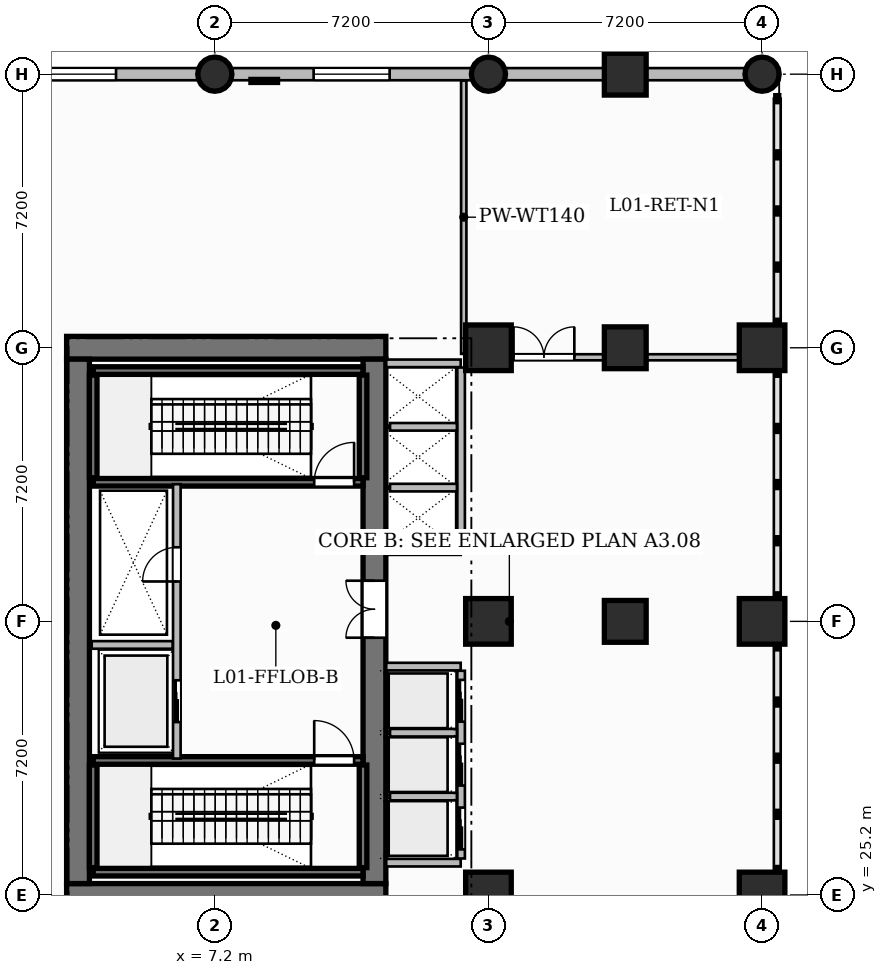
"""IFC4 building model, lengths in metres.
Left out: names, types, materials, properties, quantities, classifications, styles, units other than length and angle.
Written with IfcOpenShell. Run it as: python <this file> out.ifc"""

import sys

from ifc_helpers import new_model, si_unit, direction, frame, frame_2d, origin, origin_2d, place, context, subcontext, project, spatial, rectangle, circle, extrude, source, transform, mapped, element, fill, save


model = new_model("IFC4")
c1 = context("Model", 3, precision=1e-05, world=origin(), true_north=direction((0.0, 1.0)))
c2 = subcontext(c1, "Body", "Model", "MODEL_VIEW")
j1 = project(units=[si_unit("LENGTHUNIT", "METRE"), si_unit("PLANEANGLEUNIT", "RADIAN")], contexts=[c1])
p1 = place(None, origin())
s1 = spatial("IfcSite", under=j1, at=p1, CompositionType="ELEMENT")
p2 = place(p1, origin())
s2 = spatial("IfcBuilding", under=s1, at=p2, CompositionType="ELEMENT")
p3 = place(p2, frame((0.0, 0.0, 5.4)))
s3 = spatial("IfcBuildingStorey", under=s2, at=p3, CompositionType="ELEMENT", Elevation=5.4)
for number, where, z_axis, x_axis in (
    (1, (3.3, 25.2, 0.0), (0.0, 0.0, 1.0), (1.0, 0.0, 0.0)),
    (2, (3.3, 39.6, 0.0), (0.0, 0.0, 1.0), (1.0, 0.0, 0.0)),
):
    element("IfcWall", number, at=place(p3, frame(where, z_axis=z_axis, x_axis=x_axis)), inside=s3, PredefinedType="SHEAR", context=c2, shape_type="SweptSolid", body=[
        extrude(rectangle(XDim=8.4, YDim=0.6, at=frame_2d((4.2, 0.0))), origin(), (0.0, 0.0, 1.0), 5.4),
    ])
p4 = place(p3, frame((3.6, 25.5, 0.0), z_axis=(0.0, 0.0, 1.0), x_axis=(0.0, 1.0, 0.0)))
e3 = element("IfcWall", 3, at=p4, inside=s3, PredefinedType="SHEAR", context=c2, shape_type="SweptSolid", body=[
    extrude(rectangle(XDim=13.8, YDim=0.6, at=frame_2d((6.9, 0.0))), origin(), (0.0, 0.0, 1.0), 5.4),
])
p5 = place(p3, frame((11.4, 25.5, 0.0), z_axis=(0.0, 0.0, 1.0), x_axis=(0.0, 1.0, 0.0)))
e4 = element("IfcWall", 4, at=p5, inside=s3, PredefinedType="SHEAR", context=c2, shape_type="SweptSolid", body=[
    extrude(rectangle(XDim=13.8, YDim=0.6, at=frame_2d((6.9, 0.0))), origin(), (0.0, 0.0, 1.0), 5.4),
])
p6 = place(p5, frame((6.47, 0.0, 0.0)))
e5 = element("IfcOpeningElement", 5, at=p6, cuts=e4, PredefinedType="OPENING", context=c2, shape_type="SweptSolid", body=[
    extrude(rectangle(XDim=1.5, YDim=2.2, at=frame_2d((0.75, 1.1))), frame((0.0, 0.31, 0.0), z_axis=(0.0, -1.0, 0.0), x_axis=(1.0, 0.0, 0.0)), (0.0, 0.0, 1.0), 0.62),
])
m1 = source(origin(), c2, "Body", "SweptSolid", [
    extrude(circle(Radius=0.45, at=origin_2d()), origin(), (0.0, 0.0, 1.0), 5.4),
])
p7 = place(p3, frame((7.2, 46.8, 0.0), z_axis=(0.0, 0.0, 1.0), x_axis=(1.0, 0.0, 0.0)))
e6 = element("IfcColumn", 6, at=p7, inside=s3, PredefinedType="COLUMN", context=c2, shape_type="MappedRepresentation", body=[
    mapped(m1, transform((0.0, 0.0, 0.0), scale=1.0)),
])
m2 = source(origin(), c2, "Body", "SweptSolid", [
    extrude(rectangle(XDim=1.2, YDim=1.2, at=origin_2d()), origin(), (0.0, 0.0, 1.0), 5.4),
])
for number, where, z_axis, x_axis in (
    (7, (14.4, 25.2, 0.0), (0.0, 0.0, 1.0), (1.0, 0.0, 0.0)),
    (8, (14.4, 32.4, 0.0), (0.0, 0.0, 1.0), (1.0, 0.0, 0.0)),
    (9, (14.4, 39.6, 0.0), (0.0, 0.0, 1.0), (1.0, 0.0, 0.0)),
):
    element("IfcColumn", number, at=place(p3, frame(where, z_axis=z_axis, x_axis=x_axis)), inside=s3, PredefinedType="COLUMN", context=c2, shape_type="MappedRepresentation", body=[
        mapped(m2, transform((0.0, 0.0, 0.0), scale=1.0)),
    ])
p8 = place(p3, frame((14.4, 46.8, 0.0), z_axis=(0.0, 0.0, 1.0), x_axis=(1.0, 0.0, 0.0)))
e10 = element("IfcColumn", 10, at=p8, inside=s3, PredefinedType="COLUMN", context=c2, shape_type="MappedRepresentation", body=[
    mapped(m1, transform((0.0, 0.0, 0.0), scale=1.0)),
])
for number, where, z_axis, x_axis in (
    (11, (21.6, 25.2, 0.0), (0.0, 0.0, 1.0), (1.0, 0.0, 0.0)),
    (12, (21.6, 32.4, 0.0), (0.0, 0.0, 1.0), (1.0, 0.0, 0.0)),
    (13, (21.6, 39.6, 0.0), (0.0, 0.0, 1.0), (1.0, 0.0, 0.0)),
):
    element("IfcColumn", number, at=place(p3, frame(where, z_axis=z_axis, x_axis=x_axis)), inside=s3, PredefinedType="COLUMN", context=c2, shape_type="MappedRepresentation", body=[
        mapped(m2, transform((0.0, 0.0, 0.0), scale=1.0)),
    ])
p9 = place(p3, frame((21.6, 46.8, 0.0), z_axis=(0.0, 0.0, 1.0), x_axis=(1.0, 0.0, 0.0)))
e14 = element("IfcColumn", 14, at=p9, inside=s3, PredefinedType="COLUMN", context=c2, shape_type="MappedRepresentation", body=[
    mapped(m1, transform((0.0, 0.0, 0.0), scale=1.0)),
])
m3 = source(origin(), c2, "Body", "SweptSolid", [
    extrude(rectangle(XDim=1.1, YDim=1.1, at=origin_2d()), origin(), (0.0, 0.0, 1.0), 5.4),
])
for number, where, z_axis, x_axis in (
    (15, (18.0, 32.4, 0.0), (0.0, 0.0, 1.0), (1.0, 0.0, 0.0)),
    (16, (18.0, 39.6, 0.0), (0.0, 0.0, 1.0), (1.0, 0.0, 0.0)),
    (17, (18.0, 46.8, 0.0), (0.0, 0.0, 1.0), (1.0, 0.0, 0.0)),
):
    element("IfcColumn", number, at=place(p3, frame(where, z_axis=z_axis, x_axis=x_axis)), inside=s3, PredefinedType="COLUMN", context=c2, shape_type="MappedRepresentation", body=[
        mapped(m3, transform((0.0, 0.0, 0.0), scale=1.0)),
    ])
p10 = place(p3, frame((4.0, 25.8, 0.0), z_axis=(0.0, 0.0, 1.0), x_axis=(1.0, 0.0, 0.0)))
e18 = element("IfcWall", 18, at=p10, inside=s3, PredefinedType="SHEAR", context=c2, shape_type="SweptSolid", body=[
    extrude(rectangle(XDim=7.1, YDim=0.2, at=frame_2d((3.55, 0.0))), origin(), (0.0, 0.0, 1.0), 5.4),
])
for number, where, z_axis, x_axis in (
    (19, (4.0, 25.92, 0.0), (0.0, 0.0, 1.0), (0.0, 1.0, 0.0)),
    (20, (11.1, 25.92, 0.0), (0.0, 0.0, 1.0), (0.0, 1.0, 0.0)),
):
    element("IfcWall", number, at=place(p3, frame(where, z_axis=z_axis, x_axis=x_axis)), inside=s3, PredefinedType="SHEAR", context=c2, shape_type="SweptSolid", body=[
        extrude(rectangle(XDim=2.7, YDim=0.2, at=frame_2d((1.35, 0.0))), origin(), (0.0, 0.0, 1.0), 5.4),
    ])
p11 = place(p3, frame((4.0, 28.74, 0.0), z_axis=(0.0, 0.0, 1.0), x_axis=(1.0, 0.0, 0.0)))
e21 = element("IfcWall", 21, at=p11, inside=s3, PredefinedType="SHEAR", context=c2, shape_type="SweptSolid", body=[
    extrude(rectangle(XDim=7.1, YDim=0.2, at=frame_2d((3.55, 0.0))), origin(), (0.0, 0.0, 1.0), 5.4),
])
p12 = place(p11, frame((5.815, 0.0, 0.0)))
e22 = element("IfcOpeningElement", 22, at=p12, cuts=e21, PredefinedType="OPENING", context=c2, shape_type="SweptSolid", body=[
    extrude(rectangle(XDim=1.05, YDim=2.2, at=frame_2d((0.525, 1.1))), frame((0.0, 0.11, 0.0), z_axis=(0.0, -1.0, 0.0), x_axis=(1.0, 0.0, 0.0)), (0.0, 0.0, 1.0), 0.22),
])
p13 = place(p3, frame((4.0, 39.0, 0.0), z_axis=(0.0, 0.0, 1.0), x_axis=(1.0, 0.0, 0.0)))
e23 = element("IfcWall", 23, at=p13, inside=s3, PredefinedType="SHEAR", context=c2, shape_type="SweptSolid", body=[
    extrude(rectangle(XDim=7.1, YDim=0.2, at=frame_2d((3.55, 0.0))), origin(), (0.0, 0.0, 1.0), 5.4),
])
for number, where, z_axis, x_axis in (
    (24, (4.0, 36.18, 0.0), (0.0, 0.0, 1.0), (0.0, 1.0, 0.0)),
    (25, (11.1, 36.18, 0.0), (0.0, 0.0, 1.0), (0.0, 1.0, 0.0)),
):
    element("IfcWall", number, at=place(p3, frame(where, z_axis=z_axis, x_axis=x_axis)), inside=s3, PredefinedType="SHEAR", context=c2, shape_type="SweptSolid", body=[
        extrude(rectangle(XDim=2.7, YDim=0.2, at=frame_2d((1.35, 0.0))), origin(), (0.0, 0.0, 1.0), 5.4),
    ])
p14 = place(p3, frame((4.0, 36.06, 0.0), z_axis=(0.0, 0.0, 1.0), x_axis=(1.0, 0.0, 0.0)))
e26 = element("IfcWall", 26, at=p14, inside=s3, PredefinedType="SHEAR", context=c2, shape_type="SweptSolid", body=[
    extrude(rectangle(XDim=7.1, YDim=0.2, at=frame_2d((3.55, 0.0))), origin(), (0.0, 0.0, 1.0), 5.4),
])
p15 = place(p14, frame((5.815, 0.0, 0.0)))
e27 = element("IfcOpeningElement", 27, at=p15, cuts=e26, PredefinedType="OPENING", context=c2, shape_type="SweptSolid", body=[
    extrude(rectangle(XDim=1.05, YDim=2.2, at=frame_2d((0.525, 1.1))), frame((0.0, 0.11, 0.0), z_axis=(0.0, -1.0, 0.0), x_axis=(1.0, 0.0, 0.0)), (0.0, 0.0, 1.0), 0.22),
])
p16 = place(p3, frame((6.2, 28.79, 0.0), z_axis=(0.0, 0.0, 1.0), x_axis=(0.0, 1.0, 0.0)))
e28 = element("IfcWall", 28, at=p16, inside=s3, PredefinedType="PARTITIONING", context=c2, shape_type="SweptSolid", body=[
    extrude(rectangle(XDim=7.22, YDim=0.2, at=frame_2d((3.61, 0.0))), origin(), (0.0, 0.0, 1.0), 5.1),
])
p17 = place(p16, frame((4.66, 0.0, 0.0)))
e29 = element("IfcOpeningElement", 29, at=p17, cuts=e28, PredefinedType="OPENING", context=c2, shape_type="SweptSolid", body=[
    extrude(rectangle(XDim=0.9, YDim=2.1, at=frame_2d((0.45, 1.05))), frame((0.0, 0.11, 0.0), z_axis=(0.0, -1.0, 0.0), x_axis=(1.0, 0.0, 0.0)), (0.0, 0.0, 1.0), 0.22),
])
p18 = place(p16, frame((0.96, 0.0, 0.0)))
e30 = element("IfcOpeningElement", 30, at=p18, cuts=e28, PredefinedType="OPENING", context=c2, shape_type="SweptSolid", body=[
    extrude(rectangle(XDim=1.1, YDim=2.2, at=frame_2d((0.55, 1.1))), frame((0.0, 0.11, 0.0), z_axis=(0.0, -1.0, 0.0), x_axis=(1.0, 0.0, 0.0)), (0.0, 0.0, 1.0), 0.22),
])
p19 = place(p3, frame((3.96, 31.78, 0.0), z_axis=(0.0, 0.0, 1.0), x_axis=(1.0, 0.0, 0.0)))
e31 = element("IfcWall", 31, at=p19, inside=s3, PredefinedType="PARTITIONING", context=c2, shape_type="SweptSolid", body=[
    extrude(rectangle(XDim=2.13, YDim=0.2, at=frame_2d((1.065, 0.0))), origin(), (0.0, 0.0, 1.0), 5.1),
])
for number, where, z_axis, x_axis in (
    (32, (11.71, 26.05, 0.0), (0.0, 0.0, 1.0), (1.0, 0.0, 0.0)),
    (33, (11.71, 31.21, 0.0), (0.0, 0.0, 1.0), (1.0, 0.0, 0.0)),
):
    element("IfcWall", number, at=place(p3, frame(where, z_axis=z_axis, x_axis=x_axis)), inside=s3, PredefinedType="PARTITIONING", context=c2, shape_type="SweptSolid", body=[
        extrude(rectangle(XDim=1.96, YDim=0.2, at=frame_2d((0.98, 0.0))), origin(), (0.0, 0.0, 1.0), 5.1),
    ])
p20 = place(p3, frame((13.68, 26.16, 0.0), z_axis=(0.0, 0.0, 1.0), x_axis=(0.0, 1.0, 0.0)))
e34 = element("IfcWall", 34, at=p20, inside=s3, PredefinedType="PARTITIONING", context=c2, shape_type="SweptSolid", body=[
    extrude(rectangle(XDim=4.94, YDim=0.2, at=frame_2d((2.47, 0.0))), origin(), (0.0, 0.0, 1.0), 5.1),
])
p21 = place(p20, frame((0.24, 0.0, 0.0)))
e35 = element("IfcOpeningElement", 35, at=p21, cuts=e34, PredefinedType="OPENING", context=c2, shape_type="SweptSolid", body=[
    extrude(rectangle(XDim=1.1, YDim=2.2, at=frame_2d((0.55, 1.1))), frame((0.0, 0.11, 0.0), z_axis=(0.0, -1.0, 0.0), x_axis=(1.0, 0.0, 0.0)), (0.0, 0.0, 1.0), 0.22),
])
p22 = place(p20, frame((1.92, 0.0, 0.0)))
e36 = element("IfcOpeningElement", 36, at=p22, cuts=e34, PredefinedType="OPENING", context=c2, shape_type="SweptSolid", body=[
    extrude(rectangle(XDim=1.1, YDim=2.2, at=frame_2d((0.55, 1.1))), frame((0.0, 0.11, 0.0), z_axis=(0.0, -1.0, 0.0), x_axis=(1.0, 0.0, 0.0)), (0.0, 0.0, 1.0), 0.22),
])
p23 = place(p20, frame((3.6, 0.0, 0.0)))
e37 = element("IfcOpeningElement", 37, at=p23, cuts=e34, PredefinedType="OPENING", context=c2, shape_type="SweptSolid", body=[
    extrude(rectangle(XDim=1.1, YDim=2.2, at=frame_2d((0.55, 1.1))), frame((0.0, 0.11, 0.0), z_axis=(0.0, -1.0, 0.0), x_axis=(1.0, 0.0, 0.0)), (0.0, 0.0, 1.0), 0.22),
])
for number, where, z_axis, x_axis in (
    (38, (11.81, 27.79, 0.0), (0.0, 0.0, 1.0), (1.0, 0.0, 0.0)),
    (39, (11.81, 29.47, 0.0), (0.0, 0.0, 1.0), (1.0, 0.0, 0.0)),
):
    element("IfcWall", number, at=place(p3, frame(where, z_axis=z_axis, x_axis=x_axis)), inside=s3, PredefinedType="PARTITIONING", context=c2, shape_type="SweptSolid", body=[
        extrude(rectangle(XDim=1.76, YDim=0.2, at=frame_2d((0.88, 0.0))), origin(), (0.0, 0.0, 1.0), 5.1),
    ])
for number, where, z_axis, x_axis in (
    (40, (11.71, 34.25, 0.0), (0.0, 0.0, 1.0), (1.0, 0.0, 0.0)),
    (41, (11.71, 39.19, 0.0), (0.0, 0.0, 1.0), (1.0, 0.0, 0.0)),
):
    element("IfcWall", number, at=place(p3, frame(where, z_axis=z_axis, x_axis=x_axis)), inside=s3, PredefinedType="PARTITIONING", context=c2, shape_type="SweptSolid", body=[
        extrude(rectangle(XDim=1.96, YDim=0.2, at=frame_2d((0.98, 0.0))), origin(), (0.0, 0.0, 1.0), 5.1),
    ])
p24 = place(p3, frame((13.68, 34.36, 0.0), z_axis=(0.0, 0.0, 1.0), x_axis=(0.0, 1.0, 0.0)))
e42 = element("IfcWall", 42, at=p24, inside=s3, PredefinedType="PARTITIONING", context=c2, shape_type="SweptSolid", body=[
    extrude(rectangle(XDim=4.72, YDim=0.2, at=frame_2d((2.36, 0.0))), origin(), (0.0, 0.0, 1.0), 5.1),
])
for number, where, z_axis, x_axis in (
    (43, (11.81, 35.92, 0.0), (0.0, 0.0, 1.0), (1.0, 0.0, 0.0)),
    (44, (11.81, 37.52, 0.0), (0.0, 0.0, 1.0), (1.0, 0.0, 0.0)),
):
    element("IfcWall", number, at=place(p3, frame(where, z_axis=z_axis, x_axis=x_axis)), inside=s3, PredefinedType="PARTITIONING", context=c2, shape_type="SweptSolid", body=[
        extrude(rectangle(XDim=1.76, YDim=0.2, at=frame_2d((0.88, 0.0))), origin(), (0.0, 0.0, 1.0), 5.1),
    ])
p25 = place(p3, frame((13.75, 39.44, 0.0), z_axis=(0.0, 0.0, 1.0), x_axis=(0.0, 1.0, 0.0)))
e45 = element("IfcWall", 45, at=p25, inside=s3, PredefinedType="PARTITIONING", context=c2, shape_type="SweptSolid", body=[
    extrude(rectangle(XDim=7.192, YDim=0.14, at=frame_2d((3.596, 0.0))), origin(), (0.0, 0.0, 1.0), 5.1),
])
p26 = place(p3, frame((13.84, 39.35, 0.0), z_axis=(0.0, 0.0, 1.0), x_axis=(1.0, 0.0, 0.0)))
e46 = element("IfcWall", 46, at=p26, inside=s3, PredefinedType="PARTITIONING", context=c2, shape_type="SweptSolid", body=[
    extrude(rectangle(XDim=7.92, YDim=0.16, at=frame_2d((3.96, 0.0))), origin(), (0.0, 0.0, 1.0), 4.185),
])
p27 = place(p26, frame((1.22, 0.0, 0.0)))
e47 = element("IfcOpeningElement", 47, at=p27, cuts=e46, PredefinedType="OPENING", context=c2, shape_type="SweptSolid", body=[
    extrude(rectangle(XDim=1.6, YDim=2.4, at=frame_2d((0.8, 1.2))), frame((0.0, 0.09, 0.0), z_axis=(0.0, -1.0, 0.0), x_axis=(1.0, 0.0, 0.0)), (0.0, 0.0, 1.0), 0.18),
])
p28 = place(p3, frame((-4.8, 46.8, 0.0), z_axis=(0.0, 0.0, 1.0), x_axis=(1.0, 0.0, 0.0)))
e48 = element("IfcWall", 48, at=p28, inside=s3, PredefinedType="SOLIDWALL", context=c2, shape_type="SweptSolid", body=[
    extrude(rectangle(XDim=26.85, YDim=0.32, at=frame_2d((13.425, 0.0))), origin(), (0.0, 0.0, 1.0), 4.185),
])
p29 = place(p28, frame((1.4, 0.0, 0.75)))
e49 = element("IfcOpeningElement", 49, at=p29, cuts=e48, PredefinedType="OPENING", context=c2, shape_type="SweptSolid", body=[
    extrude(rectangle(XDim=2.0, YDim=2.6, at=frame_2d((1.0, 1.3))), frame((0.0, 0.17, 0.0), z_axis=(0.0, -1.0, 0.0), x_axis=(1.0, 0.0, 0.0)), (0.0, 0.0, 1.0), 0.34),
])
p30 = place(p28, frame((7.4, 0.0, 0.75)))
e50 = element("IfcOpeningElement", 50, at=p30, cuts=e48, PredefinedType="OPENING", context=c2, shape_type="SweptSolid", body=[
    extrude(rectangle(XDim=2.0, YDim=2.6, at=frame_2d((1.0, 1.3))), frame((0.0, 0.17, 0.0), z_axis=(0.0, -1.0, 0.0), x_axis=(1.0, 0.0, 0.0)), (0.0, 0.0, 1.0), 0.34),
])
p31 = place(p28, frame((14.6, 0.0, 0.75)))
e51 = element("IfcOpeningElement", 51, at=p31, cuts=e48, PredefinedType="OPENING", context=c2, shape_type="SweptSolid", body=[
    extrude(rectangle(XDim=2.0, YDim=2.6, at=frame_2d((1.0, 1.3))), frame((0.0, 0.17, 0.0), z_axis=(0.0, -1.0, 0.0), x_axis=(1.0, 0.0, 0.0)), (0.0, 0.0, 1.0), 0.34),
])
m4 = source(origin(), c2, "Body", "SweptSolid", [
    extrude(rectangle(XDim=1.05, YDim=2.2, at=frame_2d((0.525, 1.1))), frame((0.0, 0.025, 0.0), z_axis=(0.0, -1.0, 0.0), x_axis=(1.0, 0.0, 0.0)), (0.0, 0.0, 1.0), 0.05),
])
p32 = place(p12, origin())
e52 = element("IfcDoor", 52, at=p32, inside=s3, OperationType="SINGLE_SWING_LEFT", PredefinedType="DOOR", context=c2, shape_type="MappedRepresentation", body=[
    mapped(m4, transform((0.0, 0.0, 0.0), scale=1.0)),
])
fill(e22, e52)
p33 = place(p15, origin())
e53 = element("IfcDoor", 53, at=p33, inside=s3, OperationType="SINGLE_SWING_RIGHT", PredefinedType="DOOR", context=c2, shape_type="MappedRepresentation", body=[
    mapped(m4, transform((0.0, 0.0, 0.0), scale=1.0)),
])
fill(e27, e53)
m5 = source(origin(), c2, "Body", "SweptSolid", [
    extrude(rectangle(XDim=0.9, YDim=2.1, at=frame_2d((0.45, 1.05))), frame((0.0, 0.025, 0.0), z_axis=(0.0, -1.0, 0.0), x_axis=(1.0, 0.0, 0.0)), (0.0, 0.0, 1.0), 0.05),
])
p34 = place(p17, origin())
e54 = element("IfcDoor", 54, at=p34, inside=s3, OperationType="SINGLE_SWING_LEFT", PredefinedType="DOOR", context=c2, shape_type="MappedRepresentation", body=[
    mapped(m5, transform((0.0, 0.0, 0.0), scale=1.0)),
])
fill(e29, e54)
m6 = source(origin(), c2, "Body", "SweptSolid", [
    extrude(rectangle(XDim=1.5, YDim=2.2, at=frame_2d((0.75, 1.1))), frame((0.0, 0.025, 0.0), z_axis=(0.0, -1.0, 0.0), x_axis=(1.0, 0.0, 0.0)), (0.0, 0.0, 1.0), 0.05),
])
p35 = place(p6, origin())
e55 = element("IfcDoor", 55, at=p35, inside=s3, OperationType="DOUBLE_DOOR_SINGLE_SWING", PredefinedType="DOOR", context=c2, shape_type="MappedRepresentation", body=[
    mapped(m6, transform((0.0, 0.0, 0.0), scale=1.0)),
])
fill(e5, e55)
m7 = source(origin(), c2, "Body", "SweptSolid", [
    extrude(rectangle(XDim=1.6, YDim=2.4, at=frame_2d((0.8, 1.2))), frame((0.0, 0.025, 0.0), z_axis=(0.0, -1.0, 0.0), x_axis=(1.0, 0.0, 0.0)), (0.0, 0.0, 1.0), 0.05),
])
p36 = place(p27, origin())
e56 = element("IfcDoor", 56, at=p36, inside=s3, OperationType="DOUBLE_DOOR_SINGLE_SWING", PredefinedType="DOOR", context=c2, shape_type="MappedRepresentation", body=[
    mapped(m7, transform((0.0, 0.0, 0.0), scale=1.0)),
])
fill(e47, e56)
m8 = source(origin(), c2, "Body", "SweptSolid", [
    extrude(rectangle(XDim=1.1, YDim=2.2, at=frame_2d((0.55, 1.1))), frame((0.0, 0.025, 0.0), z_axis=(0.0, -1.0, 0.0), x_axis=(1.0, 0.0, 0.0)), (0.0, 0.0, 1.0), 0.05),
])
p37 = place(p18, origin())
e57 = element("IfcDoor", 57, at=p37, inside=s3, OperationType="SLIDING_TO_LEFT", PredefinedType="DOOR", context=c2, shape_type="MappedRepresentation", body=[
    mapped(m8, transform((0.0, 0.0, 0.0), scale=1.0)),
])
fill(e30, e57)
p38 = place(p21, origin())
e58 = element("IfcDoor", 58, at=p38, inside=s3, OperationType="SLIDING_TO_LEFT", PredefinedType="DOOR", context=c2, shape_type="MappedRepresentation", body=[
    mapped(m8, transform((0.0, 0.0, 0.0), scale=1.0)),
])
fill(e35, e58)
p39 = place(p22, origin())
e59 = element("IfcDoor", 59, at=p39, inside=s3, OperationType="SLIDING_TO_LEFT", PredefinedType="DOOR", context=c2, shape_type="MappedRepresentation", body=[
    mapped(m8, transform((0.0, 0.0, 0.0), scale=1.0)),
])
fill(e36, e59)
p40 = place(p23, origin())
e60 = element("IfcDoor", 60, at=p40, inside=s3, OperationType="SLIDING_TO_LEFT", PredefinedType="DOOR", context=c2, shape_type="MappedRepresentation", body=[
    mapped(m8, transform((0.0, 0.0, 0.0), scale=1.0)),
])
fill(e37, e60)
m9 = source(origin(), c2, "Body", "SweptSolid", [
    extrude(rectangle(XDim=2.0, YDim=2.6, at=frame_2d((1.0, 1.3))), frame((0.0, 0.03, 0.0), z_axis=(0.0, -1.0, 0.0), x_axis=(1.0, 0.0, 0.0)), (0.0, 0.0, 1.0), 0.06),
])
p41 = place(p30, origin())
e61 = element("IfcWindow", 61, at=p41, inside=s3, PartitioningType="DOUBLE_PANEL_VERTICAL", PredefinedType="WINDOW", context=c2, shape_type="MappedRepresentation", body=[
    mapped(m9, transform((0.0, 0.0, 0.0), scale=1.0)),
])
fill(e50, e61)
p42 = place(p31, origin())
e62 = element("IfcWindow", 62, at=p42, inside=s3, PartitioningType="DOUBLE_PANEL_VERTICAL", PredefinedType="WINDOW", context=c2, shape_type="MappedRepresentation", body=[
    mapped(m9, transform((0.0, 0.0, 0.0), scale=1.0)),
])
fill(e51, e62)
save(model, sys.argv[1])
